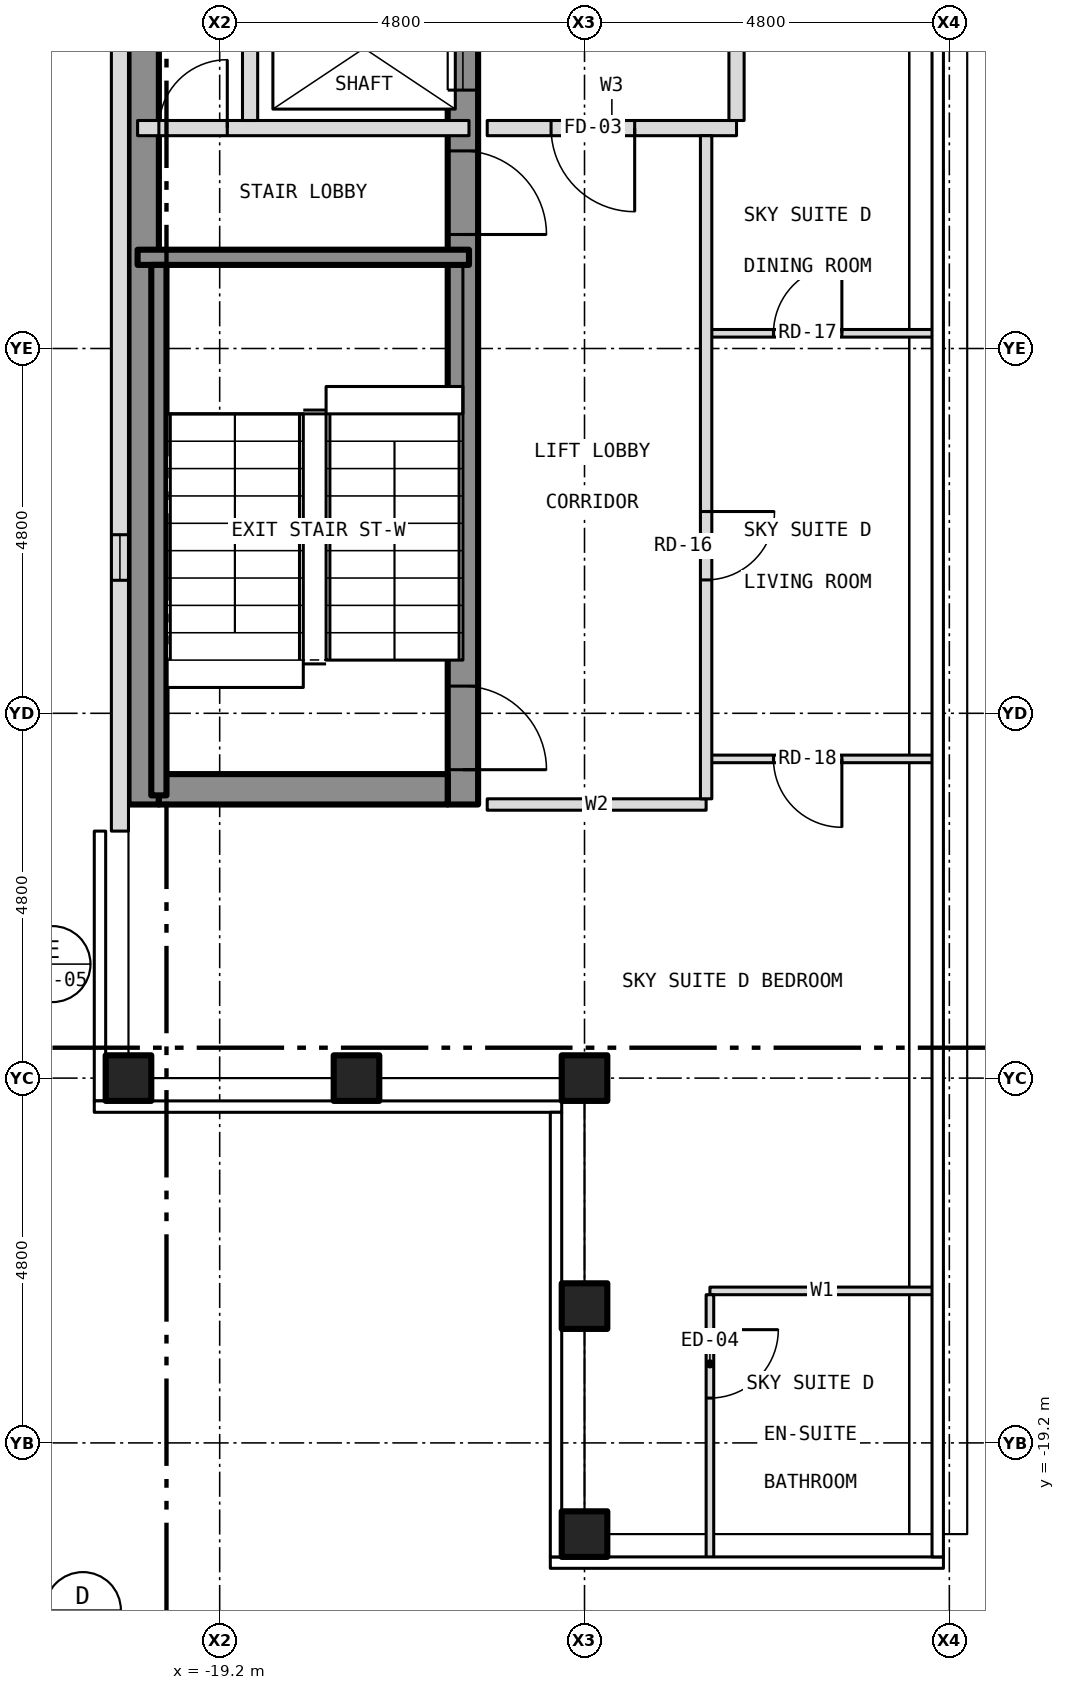
"""IFC4 building model, lengths in metres.
Left out: names, types, materials, properties, quantities, classifications, styles, units other than length and angle.
Written with IfcOpenShell. Run it as: python <this file> out.ifc"""

import sys

from ifc_helpers import new_model, si_unit, direction, frame, frame_2d, origin, origin_2d, place, context, subcontext, project, spatial, rectangle, hollow_rectangle, extrude, element, fill, save


model = new_model("IFC4")
c1 = context("Model", 3, precision=1e-05, world=origin(), true_north=direction((0.0, 1.0)))
c2 = subcontext(c1, "Body", "Model", "MODEL_VIEW")
j1 = project(units=[si_unit("LENGTHUNIT", "METRE"), si_unit("PLANEANGLEUNIT", "RADIAN")], contexts=[c1])
p1 = place(None, origin())
s1 = spatial("IfcSite", under=j1, at=p1, CompositionType="ELEMENT")
p2 = place(p1, origin())
s2 = spatial("IfcBuilding", under=s1, at=p2, CompositionType="ELEMENT")
p3 = place(p2, frame((0.0, 0.0, 279.5)))
s3 = spatial("IfcBuildingStorey", under=s2, at=p3, CompositionType="ELEMENT", Elevation=279.5)
for number, where, z_axis, x_axis in (
    (1, (-14.4, -20.4, -0.15), (0.0, 0.0, 1.0), (1.0, 0.0, 0.0)),
    (2, (-20.4, -14.4, -0.15), (0.0, 0.0, 1.0), (1.0, 0.0, 0.0)),
    (3, (-14.4, -14.4, -0.15), (0.0, 0.0, 1.0), (1.0, 0.0, 0.0)),
    (4, (-14.4, -17.4, -0.15), (0.0, 0.0, 1.0), (1.0, 0.0, 0.0)),
    (5, (-17.4, -14.4, -0.15), (0.0, 0.0, 1.0), (1.0, 0.0, 0.0)),
):
    element("IfcColumn", number, at=place(p3, frame(where, z_axis=z_axis, x_axis=x_axis)), inside=s3, PredefinedType="COLUMN", context=c2, shape_type="SweptSolid", body=[
        extrude(hollow_rectangle(XDim=0.6, YDim=0.6, WallThickness=0.03, at=origin_2d()), origin(), (0.0, 0.0, 1.0), 3.5),
    ])
p4 = place(p3, frame((-16.0, -10.8, 0.0), z_axis=(0.0, 0.0, 1.0), x_axis=(0.0, 1.0, 0.0)))
e6 = element("IfcWall", 6, at=p4, inside=s3, PredefinedType="SHEAR", context=c2, shape_type="SweptSolid", body=[
    extrude(rectangle(XDim=21.6, YDim=0.4, at=frame_2d((10.8, 0.0))), origin(), (0.0, 0.0, 1.0), 3.25),
])
p5 = place(p4, frame((9.4, 0.0, 0.0)))
e7 = element("IfcOpeningElement", 7, at=p5, cuts=e6, PredefinedType="OPENING", context=c2, shape_type="SweptSolid", body=[
    extrude(rectangle(XDim=1.1, YDim=2.1, at=frame_2d((0.55, 1.05))), frame((0.0, 0.212, 0.0), z_axis=(0.0, -1.0, 0.0), x_axis=(1.0, 0.0, 0.0)), (0.0, 0.0, 1.0), 0.424),
])
p6 = place(p4, frame((11.5, 0.0, 0.0)))
e8 = element("IfcOpeningElement", 8, at=p6, cuts=e6, PredefinedType="OPENING", context=c2, shape_type="SweptSolid", body=[
    extrude(rectangle(XDim=1.1, YDim=2.1, at=frame_2d((0.55, 1.05))), frame((0.0, 0.212, 0.0), z_axis=(0.0, -1.0, 0.0), x_axis=(1.0, 0.0, 0.0)), (0.0, 0.0, 1.0), 0.424),
])
p7 = place(p4, frame((13.6, 0.0, 0.0)))
e9 = element("IfcOpeningElement", 9, at=p7, cuts=e6, PredefinedType="OPENING", context=c2, shape_type="SweptSolid", body=[
    extrude(rectangle(XDim=1.1, YDim=2.1, at=frame_2d((0.55, 1.05))), frame((0.0, 0.212, 0.0), z_axis=(0.0, -1.0, 0.0), x_axis=(1.0, 0.0, 0.0)), (0.0, 0.0, 1.0), 0.424),
])
p8 = place(p4, frame((15.7, 0.0, 0.0)))
e10 = element("IfcOpeningElement", 10, at=p8, cuts=e6, PredefinedType="OPENING", context=c2, shape_type="SweptSolid", body=[
    extrude(rectangle(XDim=1.1, YDim=2.1, at=frame_2d((0.55, 1.05))), frame((0.0, 0.212, 0.0), z_axis=(0.0, -1.0, 0.0), x_axis=(1.0, 0.0, 0.0)), (0.0, 0.0, 1.0), 0.424),
])
p9 = place(p4, frame((17.8, 0.0, 0.0)))
e11 = element("IfcOpeningElement", 11, at=p9, cuts=e6, PredefinedType="OPENING", context=c2, shape_type="SweptSolid", body=[
    extrude(rectangle(XDim=1.1, YDim=2.1, at=frame_2d((0.55, 1.05))), frame((0.0, 0.212, 0.0), z_axis=(0.0, -1.0, 0.0), x_axis=(1.0, 0.0, 0.0)), (0.0, 0.0, 1.0), 0.424),
])
p10 = place(p4, frame((0.458, 0.0, 0.0)))
e12 = element("IfcOpeningElement", 12, at=p10, cuts=e6, PredefinedType="OPENING", context=c2, shape_type="SweptSolid", body=[
    extrude(rectangle(XDim=1.1, YDim=2.1, at=frame_2d((0.55, 1.05))), frame((0.0, 0.212, 0.0), z_axis=(0.0, -1.0, 0.0), x_axis=(1.0, 0.0, 0.0)), (0.0, 0.0, 1.0), 0.424),
])
p11 = place(p4, frame((7.5, 0.0, 0.0)))
e13 = element("IfcOpeningElement", 13, at=p11, cuts=e6, PredefinedType="OPENING", context=c2, shape_type="SweptSolid", body=[
    extrude(rectangle(XDim=1.1, YDim=2.1, at=frame_2d((0.55, 1.05))), frame((0.0, 0.212, 0.0), z_axis=(0.0, -1.0, 0.0), x_axis=(1.0, 0.0, 0.0)), (0.0, 0.0, 1.0), 0.424),
])
p12 = place(p4, frame((20.0, 0.0, 0.0)))
e14 = element("IfcOpeningElement", 14, at=p12, cuts=e6, PredefinedType="OPENING", context=c2, shape_type="SweptSolid", body=[
    extrude(rectangle(XDim=0.9, YDim=2.1, at=frame_2d((0.45, 1.05))), frame((0.0, 0.212, 0.0), z_axis=(0.0, -1.0, 0.0), x_axis=(1.0, 0.0, 0.0)), (0.0, 0.0, 1.0), 0.424),
])
p13 = place(p3, frame((-20.2, -10.8, 0.0), z_axis=(0.0, 0.0, 1.0), x_axis=(0.0, 1.0, 0.0)))
e15 = element("IfcWall", 15, at=p13, inside=s3, PredefinedType="SHEAR", context=c2, shape_type="SweptSolid", body=[
    extrude(rectangle(XDim=21.6, YDim=0.4, at=frame_2d((10.8, 0.0))), origin(), (0.0, 0.0, 1.0), 3.25),
])
p14 = place(p3, frame((-20.0, -10.6, 0.0), z_axis=(0.0, 0.0, 1.0), x_axis=(1.0, 0.0, 0.0)))
e16 = element("IfcWall", 16, at=p14, inside=s3, PredefinedType="SHEAR", context=c2, shape_type="SweptSolid", body=[
    extrude(rectangle(XDim=3.8, YDim=0.4, at=frame_2d((1.9, 0.0))), origin(), (0.0, 0.0, 1.0), 3.25),
])
p15 = place(p3, frame((-20.512, 11.15, 0.0), z_axis=(0.0, 0.0, 1.0), x_axis=(0.0, -1.0, 0.0)))
e17 = element("IfcWall", 17, at=p15, inside=s3, PredefinedType="SOLIDWALL", context=c2, shape_type="SweptSolid", body=[
    extrude(rectangle(XDim=22.3, YDim=0.225, at=frame_2d((11.15, 0.0))), origin(), (0.0, 0.0, 1.0), 3.5),
])
p16 = place(p15, frame((18.4, 0.0, 1.0)))
e18 = element("IfcOpeningElement", 18, at=p16, cuts=e17, PredefinedType="OPENING", context=c2, shape_type="SweptSolid", body=[
    extrude(rectangle(XDim=0.6, YDim=1.5, at=frame_2d((0.3, 0.75))), frame((0.0, 0.125, 0.0), z_axis=(0.0, -1.0, 0.0), x_axis=(1.0, 0.0, 0.0)), (0.0, 0.0, 1.0), 0.249),
])
p17 = place(p3, frame((-12.75, -17.2, 0.0), z_axis=(0.0, 0.0, 1.0), x_axis=(1.0, 0.0, 0.0)))
e19 = element("IfcWall", 19, at=p17, inside=s3, PredefinedType="PARTITIONING", context=c2, shape_type="SweptSolid", body=[
    extrude(rectangle(XDim=2.952, YDim=0.1, at=frame_2d((1.476, 0.0))), origin(), (0.0, 0.0, 1.0), 3.35),
])
p18 = place(p3, frame((-15.68, -10.8, 0.0), z_axis=(0.0, 0.0, 1.0), x_axis=(1.0, 0.0, 0.0)))
e20 = element("IfcWall", 20, at=p18, inside=s3, PredefinedType="PARTITIONING", context=c2, shape_type="SweptSolid", body=[
    extrude(rectangle(XDim=2.88, YDim=0.15, at=frame_2d((1.44, 0.0))), origin(), (0.0, 0.0, 1.0), 3.35),
])
p19 = place(p3, frame((-12.8, -10.2, 0.0), z_axis=(0.0, 0.0, 1.0), x_axis=(1.0, 0.0, 0.0)))
e21 = element("IfcWall", 21, at=p19, inside=s3, PredefinedType="PARTITIONING", context=c2, shape_type="SweptSolid", body=[
    extrude(rectangle(XDim=3.002, YDim=0.1, at=frame_2d((1.501, 0.0))), origin(), (0.0, 0.0, 1.0), 3.35),
])
p20 = place(p19, frame((0.886, 0.0, 0.0)))
e22 = element("IfcOpeningElement", 22, at=p20, cuts=e21, PredefinedType="OPENING", context=c2, shape_type="SweptSolid", body=[
    extrude(rectangle(XDim=0.9, YDim=2.1, at=frame_2d((0.45, 1.05))), frame((0.0, 0.062, 0.0), z_axis=(0.0, -1.0, 0.0), x_axis=(1.0, 0.0, 0.0)), (0.0, 0.0, 1.0), 0.124),
])
p21 = place(p3, frame((-12.8, -4.6, 0.0), z_axis=(0.0, 0.0, 1.0), x_axis=(1.0, 0.0, 0.0)))
e23 = element("IfcWall", 23, at=p21, inside=s3, PredefinedType="PARTITIONING", context=c2, shape_type="SweptSolid", body=[
    extrude(rectangle(XDim=3.002, YDim=0.1, at=frame_2d((1.501, 0.0))), origin(), (0.0, 0.0, 1.0), 3.35),
])
p22 = place(p21, frame((0.886, 0.0, 0.0)))
e24 = element("IfcOpeningElement", 24, at=p22, cuts=e23, PredefinedType="OPENING", context=c2, shape_type="SweptSolid", body=[
    extrude(rectangle(XDim=0.9, YDim=2.1, at=frame_2d((0.45, 1.05))), frame((0.0, 0.062, 0.0), z_axis=(0.0, -1.0, 0.0), x_axis=(1.0, 0.0, 0.0)), (0.0, 0.0, 1.0), 0.124),
])
p23 = place(p3, frame((-20.28, -3.6, 0.0), z_axis=(0.0, 0.0, 1.0), x_axis=(1.0, 0.0, 0.0)))
e25 = element("IfcWall", 25, at=p23, inside=s3, PredefinedType="SHEAR", context=c2, shape_type="SweptSolid", body=[
    extrude(rectangle(XDim=4.36, YDim=0.2, at=frame_2d((2.18, 0.0))), origin(), (0.0, 0.0, 1.0), 3.25),
])
p24 = place(p3, frame((-20.28, -1.9, 0.0), z_axis=(0.0, 0.0, 1.0), x_axis=(1.0, 0.0, 0.0)))
e26 = element("IfcWall", 26, at=p24, inside=s3, PredefinedType="PARTITIONING", context=c2, shape_type="SweptSolid", body=[
    extrude(rectangle(XDim=4.36, YDim=0.2, at=frame_2d((2.18, 0.0))), origin(), (0.0, 0.0, 1.0), 3.25),
])
p25 = place(p24, frame((0.28, 0.0, 0.0)))
e27 = element("IfcOpeningElement", 27, at=p25, cuts=e26, PredefinedType="OPENING", context=c2, shape_type="SweptSolid", body=[
    extrude(rectangle(XDim=0.9, YDim=2.1, at=frame_2d((0.45, 1.05))), frame((0.0, 0.112, 0.0), z_axis=(0.0, -1.0, 0.0), x_axis=(1.0, 0.0, 0.0)), (0.0, 0.0, 1.0), 0.224),
])
p26 = place(p3, frame((-15.68, -1.9, 0.0), z_axis=(0.0, 0.0, 1.0), x_axis=(1.0, 0.0, 0.0)))
e28 = element("IfcWall", 28, at=p26, inside=s3, PredefinedType="PARTITIONING", context=c2, shape_type="SweptSolid", body=[
    extrude(rectangle(XDim=3.28, YDim=0.2, at=frame_2d((1.64, 0.0))), origin(), (0.0, 0.0, 1.0), 3.35),
])
p27 = place(p26, frame((0.84, 0.0, 0.0)))
e29 = element("IfcOpeningElement", 29, at=p27, cuts=e28, PredefinedType="OPENING", context=c2, shape_type="SweptSolid", body=[
    extrude(rectangle(XDim=1.1, YDim=2.1, at=frame_2d((0.55, 1.05))), frame((0.0, 0.112, 0.0), z_axis=(0.0, -1.0, 0.0), x_axis=(1.0, 0.0, 0.0)), (0.0, 0.0, 1.0), 0.224),
])
p28 = place(p3, frame((-20.0, -10.68, 0.0), z_axis=(0.0, 0.0, 1.0), x_axis=(0.0, 1.0, 0.0)))
e30 = element("IfcWall", 30, at=p28, inside=s3, PredefinedType="SHEAR", context=c2, shape_type="SweptSolid", body=[
    extrude(rectangle(XDim=6.98, YDim=0.2, at=frame_2d((3.49, 0.0))), origin(), (0.0, 0.0, 1.0), 3.25),
])
p29 = place(p3, frame((-18.8, -1.8, 0.0), z_axis=(0.0, 0.0, 1.0), x_axis=(0.0, 1.0, 0.0)))
e31 = element("IfcWall", 31, at=p29, inside=s3, PredefinedType="PARTITIONING", context=c2, shape_type="SweptSolid", body=[
    extrude(rectangle(XDim=6.1, YDim=0.2, at=frame_2d((3.05, 0.0))), origin(), (0.0, 0.0, 1.0), 3.25),
])
p30 = place(p3, frame((-12.8, -10.725, 0.0), z_axis=(0.0, 0.0, 1.0), x_axis=(0.0, 1.0, 0.0)))
e32 = element("IfcWall", 32, at=p30, inside=s3, PredefinedType="PARTITIONING", context=c2, shape_type="SweptSolid", body=[
    extrude(rectangle(XDim=8.725, YDim=0.15, at=frame_2d((4.363, 0.0))), origin(), (0.0, 0.0, 1.0), 3.35),
])
p31 = place(p30, frame((2.88, 0.0, 0.0)))
e33 = element("IfcOpeningElement", 33, at=p31, cuts=e32, PredefinedType="OPENING", context=c2, shape_type="SweptSolid", body=[
    extrude(rectangle(XDim=0.9, YDim=2.1, at=frame_2d((0.45, 1.05))), frame((0.0, 0.087, 0.0), z_axis=(0.0, -1.0, 0.0), x_axis=(1.0, 0.0, 0.0)), (0.0, 0.0, 1.0), 0.174),
])
p32 = place(p3, frame((-12.75, -20.73, 0.0), z_axis=(0.0, 0.0, 1.0), x_axis=(0.0, 1.0, 0.0)))
e34 = element("IfcWall", 34, at=p32, inside=s3, PredefinedType="PARTITIONING", context=c2, shape_type="SweptSolid", body=[
    extrude(rectangle(XDim=3.48, YDim=0.1, at=frame_2d((1.74, 0.0))), origin(), (0.0, 0.0, 1.0), 3.35),
])
p33 = place(p32, frame((2.12, 0.0, 0.0)))
e35 = element("IfcOpeningElement", 35, at=p33, cuts=e34, PredefinedType="OPENING", context=c2, shape_type="SweptSolid", body=[
    extrude(rectangle(XDim=0.9, YDim=2.1, at=frame_2d((0.45, 1.05))), frame((0.0, 0.062, 0.0), z_axis=(0.0, -1.0, 0.0), x_axis=(1.0, 0.0, 0.0)), (0.0, 0.0, 1.0), 0.124),
])
p34 = place(p3, frame((-12.4, -1.8, 0.0), z_axis=(0.0, 0.0, 1.0), x_axis=(0.0, 1.0, 0.0)))
e36 = element("IfcWall", 36, at=p34, inside=s3, PredefinedType="PARTITIONING", context=c2, shape_type="SweptSolid", body=[
    extrude(rectangle(XDim=4.0, YDim=0.2, at=frame_2d((2.0, 0.0))), origin(), (0.0, 0.0, 1.0), 3.35),
])
p35 = place(p16, origin())
e37 = element("IfcWindow", 37, at=p35, inside=s3, PartitioningType="SINGLE_PANEL", PredefinedType="WINDOW", context=c2, shape_type="SweptSolid", body=[
    extrude(rectangle(XDim=0.6, YDim=1.5, at=frame_2d((0.3, 0.75))), frame((0.0, -0.022, 0.0), z_axis=(0.0, -1.0, 0.0), x_axis=(1.0, 0.0, 0.0)), (0.0, 0.0, 1.0), 0.06),
])
fill(e18, e37)
p36 = place(p5, origin())
e38 = element("IfcDoor", 38, at=p36, inside=s3, OperationType="SLIDING_TO_LEFT", PredefinedType="DOOR", context=c2, shape_type="SweptSolid", body=[
    extrude(rectangle(XDim=1.1, YDim=2.1, at=frame_2d((0.55, 1.05))), frame((0.0, 0.025, 0.0), z_axis=(0.0, -1.0, 0.0), x_axis=(1.0, 0.0, 0.0)), (0.0, 0.0, 1.0), 0.05),
])
fill(e7, e38)
p37 = place(p10, origin())
e39 = element("IfcDoor", 39, at=p37, inside=s3, OperationType="SINGLE_SWING_LEFT", PredefinedType="DOOR", context=c2, shape_type="SweptSolid", body=[
    extrude(rectangle(XDim=1.1, YDim=2.1, at=frame_2d((0.55, 1.05))), frame((0.0, 0.025, 0.0), z_axis=(0.0, -1.0, 0.0), x_axis=(1.0, 0.0, 0.0)), (0.0, 0.0, 1.0), 0.05),
])
fill(e12, e39)
p38 = place(p11, origin())
e40 = element("IfcDoor", 40, at=p38, inside=s3, OperationType="SINGLE_SWING_LEFT", PredefinedType="DOOR", context=c2, shape_type="SweptSolid", body=[
    extrude(rectangle(XDim=1.1, YDim=2.1, at=frame_2d((0.55, 1.05))), frame((0.0, 0.025, 0.0), z_axis=(0.0, -1.0, 0.0), x_axis=(1.0, 0.0, 0.0)), (0.0, 0.0, 1.0), 0.05),
])
fill(e13, e40)
p39 = place(p25, origin())
e41 = element("IfcDoor", 41, at=p39, inside=s3, OperationType="SINGLE_SWING_RIGHT", PredefinedType="DOOR", context=c2, shape_type="SweptSolid", body=[
    extrude(rectangle(XDim=0.9, YDim=2.1, at=frame_2d((0.45, 1.05))), frame((0.0, 0.025, 0.0), z_axis=(0.0, -1.0, 0.0), x_axis=(1.0, 0.0, 0.0)), (0.0, 0.0, 1.0), 0.05),
])
fill(e27, e41)
p40 = place(p27, origin())
e42 = element("IfcDoor", 42, at=p40, inside=s3, OperationType="SINGLE_SWING_RIGHT", PredefinedType="DOOR", context=c2, shape_type="SweptSolid", body=[
    extrude(rectangle(XDim=1.1, YDim=2.1, at=frame_2d((0.55, 1.05))), frame((0.0, 0.025, 0.0), z_axis=(0.0, -1.0, 0.0), x_axis=(1.0, 0.0, 0.0)), (0.0, 0.0, 1.0), 0.05),
])
fill(e29, e42)
p41 = place(p31, origin())
e43 = element("IfcDoor", 43, at=p41, inside=s3, OperationType="SINGLE_SWING_RIGHT", PredefinedType="DOOR", context=c2, shape_type="SweptSolid", body=[
    extrude(rectangle(XDim=0.9, YDim=2.1, at=frame_2d((0.45, 1.05))), frame((0.0, 0.025, 0.0), z_axis=(0.0, -1.0, 0.0), x_axis=(1.0, 0.0, 0.0)), (0.0, 0.0, 1.0), 0.05),
])
fill(e33, e43)
p42 = place(p22, origin())
e44 = element("IfcDoor", 44, at=p42, inside=s3, OperationType="SINGLE_SWING_RIGHT", PredefinedType="DOOR", context=c2, shape_type="SweptSolid", body=[
    extrude(rectangle(XDim=0.9, YDim=2.1, at=frame_2d((0.45, 1.05))), frame((0.0, 0.025, 0.0), z_axis=(0.0, -1.0, 0.0), x_axis=(1.0, 0.0, 0.0)), (0.0, 0.0, 1.0), 0.05),
])
fill(e24, e44)
p43 = place(p20, origin())
e45 = element("IfcDoor", 45, at=p43, inside=s3, OperationType="SINGLE_SWING_RIGHT", PredefinedType="DOOR", context=c2, shape_type="SweptSolid", body=[
    extrude(rectangle(XDim=0.9, YDim=2.1, at=frame_2d((0.45, 1.05))), frame((0.0, 0.025, 0.0), z_axis=(0.0, -1.0, 0.0), x_axis=(1.0, 0.0, 0.0)), (0.0, 0.0, 1.0), 0.05),
])
fill(e22, e45)
p44 = place(p33, origin())
e46 = element("IfcDoor", 46, at=p44, inside=s3, OperationType="SINGLE_SWING_RIGHT", PredefinedType="DOOR", context=c2, shape_type="SweptSolid", body=[
    extrude(rectangle(XDim=0.9, YDim=2.1, at=frame_2d((0.45, 1.05))), frame((0.0, 0.025, 0.0), z_axis=(0.0, -1.0, 0.0), x_axis=(1.0, 0.0, 0.0)), (0.0, 0.0, 1.0), 0.05),
])
fill(e35, e46)
save(model, sys.argv[1])
